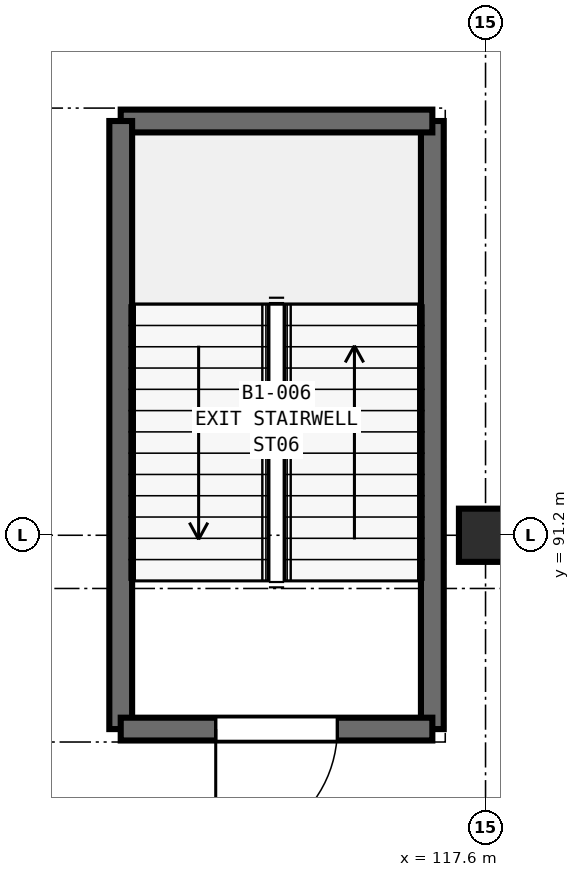
"""IFC4 building model, lengths in metres.
Left out: names, types, materials, properties, quantities, classifications, styles, units other than length and angle.
Written with IfcOpenShell. Run it as: python <this file> out.ifc"""

import sys

from ifc_helpers import new_model, si_unit, direction, frame, frame_2d, origin, origin_2d, place, context, subcontext, project, spatial, rectangle, extrude, element, fill, save


model = new_model("IFC4")
c1 = context("Model", 3, precision=1e-05, world=origin(), true_north=direction((0.0, 1.0)))
c2 = subcontext(c1, "Body", "Model", "MODEL_VIEW")
j1 = project(units=[si_unit("LENGTHUNIT", "METRE"), si_unit("PLANEANGLEUNIT", "RADIAN")], contexts=[c1])
p1 = place(None, origin())
s1 = spatial("IfcSite", under=j1, at=p1, CompositionType="ELEMENT")
p2 = place(p1, origin())
s2 = spatial("IfcBuilding", under=s1, at=p2, CompositionType="ELEMENT")
p3 = place(p2, frame((0.0, 0.0, -4.8)))
s3 = spatial("IfcBuildingStorey", under=s2, at=p3, CompositionType="ELEMENT", Elevation=-4.8)
p4 = place(p3, frame((117.6, 91.2, 0.0), z_axis=(0.0, 0.0, 1.0), x_axis=(1.0, 0.0, 0.0)))
e1 = element("IfcColumn", 1, at=p4, inside=s3, PredefinedType="COLUMN", context=c2, shape_type="SweptSolid", body=[
    extrude(rectangle(XDim=0.7, YDim=0.7, at=origin_2d()), origin(), (0.0, 0.0, 1.0), 4.8),
])
p5 = place(p3, frame((116.9, 88.65, 0.0), z_axis=(0.0, 0.0, 1.0), x_axis=(0.0, 1.0, 0.0)))
e2 = element("IfcWall", 2, at=p5, inside=s3, PredefinedType="SHEAR", context=c2, shape_type="SweptSolid", body=[
    extrude(rectangle(XDim=8.0, YDim=0.3, at=frame_2d((4.0, 0.0))), origin(), (0.0, 0.0, 1.0), 4.8),
])
p6 = place(p3, frame((116.9, 96.65, 0.0), z_axis=(0.0, 0.0, 1.0), x_axis=(-1.0, 0.0, 0.0)))
e3 = element("IfcWall", 3, at=p6, inside=s3, PredefinedType="SHEAR", context=c2, shape_type="SweptSolid", body=[
    extrude(rectangle(XDim=4.1, YDim=0.3, at=frame_2d((2.05, 0.0))), origin(), (0.0, 0.0, 1.0), 4.8),
])
p7 = place(p3, frame((112.8, 96.65, 0.0), z_axis=(0.0, 0.0, 1.0), x_axis=(0.0, -1.0, 0.0)))
e4 = element("IfcWall", 4, at=p7, inside=s3, PredefinedType="SHEAR", context=c2, shape_type="SweptSolid", body=[
    extrude(rectangle(XDim=8.0, YDim=0.3, at=frame_2d((4.0, 0.0))), origin(), (0.0, 0.0, 1.0), 4.8),
])
p8 = place(p3, frame((112.8, 88.65, 0.0), z_axis=(0.0, 0.0, 1.0), x_axis=(1.0, 0.0, 0.0)))
e5 = element("IfcWall", 5, at=p8, inside=s3, PredefinedType="SHEAR", context=c2, shape_type="SweptSolid", body=[
    extrude(rectangle(XDim=4.1, YDim=0.3, at=frame_2d((2.05, 0.0))), origin(), (0.0, 0.0, 1.0), 4.8),
])
p9 = place(p8, frame((1.25, 0.0, 0.0)))
e6 = element("IfcOpeningElement", 6, at=p9, cuts=e5, PredefinedType="OPENING", context=c2, shape_type="SweptSolid", body=[
    extrude(rectangle(XDim=1.6, YDim=2.25, at=frame_2d((0.8, 1.125))), frame((0.0, 0.16, 0.0), z_axis=(0.0, -1.0, 0.0), x_axis=(1.0, 0.0, 0.0)), (0.0, 0.0, 1.0), 0.32),
])
p10 = place(p9, frame((1.6, 0.0, 0.0), z_axis=(0.0, 0.0, 1.0), x_axis=(-1.0, 0.0, 0.0)))
e7 = element("IfcDoor", 7, at=p10, inside=s3, OperationType="SINGLE_SWING_RIGHT", PredefinedType="DOOR", context=c2, shape_type="SweptSolid", body=[
    extrude(rectangle(XDim=1.6, YDim=2.25, at=frame_2d((0.8, 1.125))), frame((0.0, 0.025, 0.0), z_axis=(0.0, -1.0, 0.0), x_axis=(1.0, 0.0, 0.0)), (0.0, 0.0, 1.0), 0.05),
])
fill(e6, e7)
save(model, sys.argv[1])
